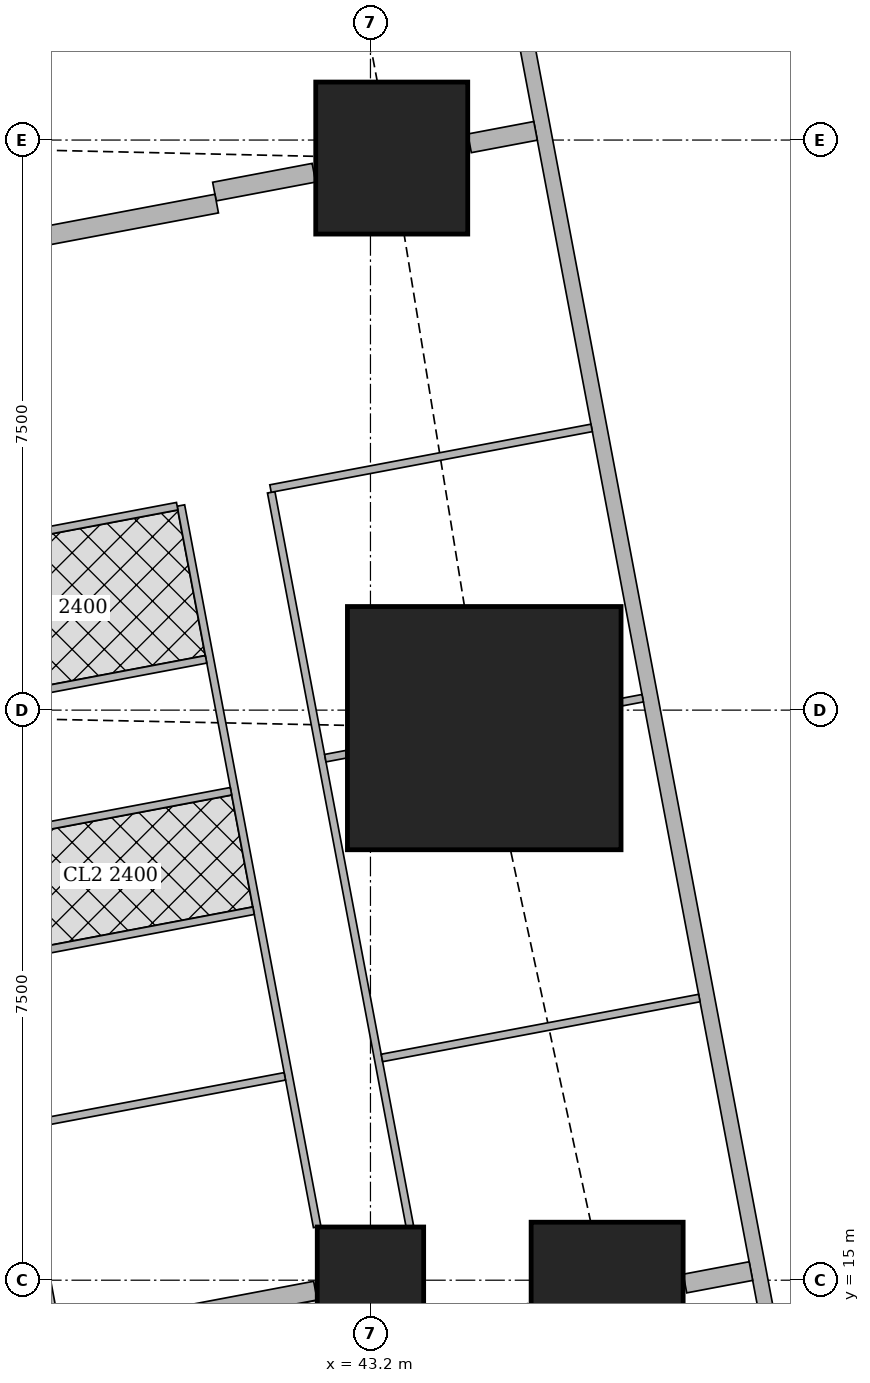
"""IFC4 building model, lengths in metres.
Left out: names, types, materials, properties, quantities, classifications, styles, units other than length and angle.
Written with IfcOpenShell. Run it as: python <this file> out.ifc"""

import sys

from ifc_helpers import new_model, si_unit, direction, frame, frame_2d, origin, origin_2d, place, context, subcontext, project, spatial, rectangle, extrude, element, fill, save


model = new_model("IFC4")
c1 = context("Model", 3, precision=1e-05, world=origin(), true_north=direction((0.0, 1.0)))
c2 = subcontext(c1, "Body", "Model", "MODEL_VIEW")
j1 = project(units=[si_unit("LENGTHUNIT", "METRE"), si_unit("PLANEANGLEUNIT", "RADIAN")], contexts=[c1])
p1 = place(None, origin())
s1 = spatial("IfcSite", under=j1, at=p1, CompositionType="ELEMENT")
p2 = place(p1, origin())
s2 = spatial("IfcBuilding", under=s1, at=p2, CompositionType="ELEMENT")
p3 = place(p2, frame((0.0, 0.0, 274.1)))
s3 = spatial("IfcBuildingStorey", under=s2, at=p3, CompositionType="ELEMENT", Elevation=274.1)
p4 = place(p3, frame((43.2, 15.0, 0.0), z_axis=(0.0, 0.0, 1.0), x_axis=(1.0, 0.0, 0.0)))
e1 = element("IfcColumn", 1, at=p4, inside=s3, PredefinedType="COLUMN", context=c2, shape_type="SweptSolid", body=[
    extrude(rectangle(XDim=1.4, YDim=1.4, at=origin_2d()), origin(), (0.0, 0.0, 1.0), 3.75),
])
p5 = place(p3, frame((46.314, 14.763, 0.0), z_axis=(0.0, 0.0, 1.0), x_axis=(1.0, 0.0, 0.0)))
e2 = element("IfcColumn", 2, at=p5, inside=s3, PredefinedType="COLUMN", context=c2, shape_type="SweptSolid", body=[
    extrude(rectangle(XDim=2.0, YDim=2.0, at=origin_2d()), origin(), (0.0, 0.0, 1.0), 3.75),
])
p6 = place(p3, frame((44.697, 22.263, 0.0), z_axis=(0.0, 0.0, 1.0), x_axis=(1.0, 0.0, 0.0)))
e3 = element("IfcColumn", 3, at=p6, inside=s3, PredefinedType="COLUMN", context=c2, shape_type="SweptSolid", body=[
    extrude(rectangle(XDim=3.6, YDim=3.2, at=origin_2d()), origin(), (0.0, 0.0, 1.0), 3.75),
])
p7 = place(p3, frame((43.48, 29.763, 0.0), z_axis=(0.0, 0.0, 1.0), x_axis=(1.0, 0.0, 0.0)))
e4 = element("IfcColumn", 4, at=p7, inside=s3, PredefinedType="COLUMN", context=c2, shape_type="SweptSolid", body=[
    extrude(rectangle(XDim=2.0, YDim=2.0, at=origin_2d()), origin(), (0.0, 0.0, 1.0), 3.75),
])
p8 = place(p3, frame((49.684, 7.832, 0.0), z_axis=(0.0, 0.0, 1.0), x_axis=(-0.185616669694, 0.982622232565, 0.0)))
e5 = element("IfcWall", 5, at=p8, inside=s3, PredefinedType="SOLIDWALL", context=c2, shape_type="SweptSolid", body=[
    extrude(rectangle(XDim=36.0, YDim=0.2, at=frame_2d((18.0, 0.0))), origin(), (0.0, 0.0, 1.0), 3.5),
])
p9 = place(p8, frame((2.518, 0.0, 0.9)))
e6 = element("IfcOpeningElement", 6, at=p9, cuts=e5, PredefinedType="OPENING", context=c2, shape_type="SweptSolid", body=[
    extrude(rectangle(XDim=2.4, YDim=1.5, at=frame_2d((1.2, 0.75))), frame((0.0, 0.11, 0.0), z_axis=(0.0, -1.0, 0.0), x_axis=(1.0, 0.0, 0.0)), (0.0, 0.0, 1.0), 0.22),
])
p10 = place(p8, frame((8.444, 0.0, 0.9)))
e7 = element("IfcOpeningElement", 7, at=p10, cuts=e5, PredefinedType="OPENING", context=c2, shape_type="SweptSolid", body=[
    extrude(rectangle(XDim=1.8, YDim=1.5, at=frame_2d((0.9, 0.75))), frame((0.0, 0.11, 0.0), z_axis=(0.0, -1.0, 0.0), x_axis=(1.0, 0.0, 0.0)), (0.0, 0.0, 1.0), 0.22),
])
p11 = place(p8, frame((12.261, 0.0, 0.9)))
e8 = element("IfcOpeningElement", 8, at=p11, cuts=e5, PredefinedType="OPENING", context=c2, shape_type="SweptSolid", body=[
    extrude(rectangle(XDim=1.8, YDim=1.5, at=frame_2d((0.9, 0.75))), frame((0.0, 0.11, 0.0), z_axis=(0.0, -1.0, 0.0), x_axis=(1.0, 0.0, 0.0)), (0.0, 0.0, 1.0), 0.22),
])
p12 = place(p8, frame((16.078, 0.0, 0.9)))
e9 = element("IfcOpeningElement", 9, at=p12, cuts=e5, PredefinedType="OPENING", context=c2, shape_type="SweptSolid", body=[
    extrude(rectangle(XDim=1.8, YDim=1.5, at=frame_2d((0.9, 0.75))), frame((0.0, 0.11, 0.0), z_axis=(0.0, -1.0, 0.0), x_axis=(1.0, 0.0, 0.0)), (0.0, 0.0, 1.0), 0.22),
])
p13 = place(p8, frame((19.894, 0.0, 0.9)))
e10 = element("IfcOpeningElement", 10, at=p13, cuts=e5, PredefinedType="OPENING", context=c2, shape_type="SweptSolid", body=[
    extrude(rectangle(XDim=1.8, YDim=1.5, at=frame_2d((0.9, 0.75))), frame((0.0, 0.11, 0.0), z_axis=(0.0, -1.0, 0.0), x_axis=(1.0, 0.0, 0.0)), (0.0, 0.0, 1.0), 0.22),
])
p14 = place(p8, frame((23.71, 0.0, 0.9)))
e11 = element("IfcOpeningElement", 11, at=p14, cuts=e5, PredefinedType="OPENING", context=c2, shape_type="SweptSolid", body=[
    extrude(rectangle(XDim=1.8, YDim=1.5, at=frame_2d((0.9, 0.75))), frame((0.0, 0.11, 0.0), z_axis=(0.0, -1.0, 0.0), x_axis=(1.0, 0.0, 0.0)), (0.0, 0.0, 1.0), 0.22),
])
p15 = place(p8, frame((27.526, 0.0, 0.9)))
e12 = element("IfcOpeningElement", 12, at=p15, cuts=e5, PredefinedType="OPENING", context=c2, shape_type="SweptSolid", body=[
    extrude(rectangle(XDim=1.8, YDim=1.5, at=frame_2d((0.9, 0.75))), frame((0.0, 0.11, 0.0), z_axis=(0.0, -1.0, 0.0), x_axis=(1.0, 0.0, 0.0)), (0.0, 0.0, 1.0), 0.22),
])
p16 = place(p8, frame((32.046, 0.0, 0.9)))
e13 = element("IfcOpeningElement", 13, at=p16, cuts=e5, PredefinedType="OPENING", context=c2, shape_type="SweptSolid", body=[
    extrude(rectangle(XDim=1.8, YDim=1.5, at=frame_2d((0.9, 0.75))), frame((0.0, 0.11, 0.0), z_axis=(0.0, -1.0, 0.0), x_axis=(1.0, 0.0, 0.0)), (0.0, 0.0, 1.0), 0.22),
])
p17 = place(p3, frame((33.781, 42.186, 0.0), z_axis=(0.0, 0.0, 1.0), x_axis=(0.185593518645, -0.9826266055, 0.0)))
e14 = element("IfcWall", 14, at=p17, inside=s3, PredefinedType="SOLIDWALL", context=c2, shape_type="SweptSolid", body=[
    extrude(rectangle(XDim=35.961, YDim=0.15, at=frame_2d((17.98, 0.0))), origin(), (0.0, 0.0, 1.0), 2.5),
])
p18 = place(p17, frame((11.76, 0.0, 0.0)))
e15 = element("IfcOpeningElement", 15, at=p18, cuts=e14, PredefinedType="OPENING", context=c2, shape_type="SweptSolid", body=[
    extrude(rectangle(XDim=1.0, YDim=2.1, at=frame_2d((0.5, 1.05))), frame((0.0, 0.085, 0.0), z_axis=(0.0, -1.0, 0.0), x_axis=(1.0, 0.0, 0.0)), (0.0, 0.0, 1.0), 0.17),
])
p19 = place(p17, frame((15.576, 0.0, 0.0)))
e16 = element("IfcOpeningElement", 16, at=p19, cuts=e14, PredefinedType="OPENING", context=c2, shape_type="SweptSolid", body=[
    extrude(rectangle(XDim=1.0, YDim=2.1, at=frame_2d((0.5, 1.05))), frame((0.0, 0.085, 0.0), z_axis=(0.0, -1.0, 0.0), x_axis=(1.0, 0.0, 0.0)), (0.0, 0.0, 1.0), 0.17),
])
p20 = place(p17, frame((30.502, 0.0, 0.0)))
e17 = element("IfcOpeningElement", 17, at=p20, cuts=e14, PredefinedType="OPENING", context=c2, shape_type="SweptSolid", body=[
    extrude(rectangle(XDim=1.0, YDim=2.1, at=frame_2d((0.5, 1.05))), frame((0.0, 0.085, 0.0), z_axis=(0.0, -1.0, 0.0), x_axis=(1.0, 0.0, 0.0)), (0.0, 0.0, 1.0), 0.17),
])
p21 = place(p3, frame((41.894, 25.366, 0.0), z_axis=(0.0, 0.0, 1.0), x_axis=(0.185612905165, -0.982622943675, 0.0)))
e18 = element("IfcWall", 18, at=p21, inside=s3, PredefinedType="PARTITIONING", context=c2, shape_type="SweptSolid", body=[
    extrude(rectangle(XDim=9.827, YDim=0.1, at=frame_2d((4.913, 0.0))), origin(), (0.0, 0.0, 1.0), 2.5),
])
p22 = place(p21, frame((0.151, 0.0, 0.0)))
e19 = element("IfcOpeningElement", 19, at=p22, cuts=e18, PredefinedType="OPENING", context=c2, shape_type="SweptSolid", body=[
    extrude(rectangle(XDim=0.9, YDim=2.1, at=frame_2d((0.45, 1.05))), frame((0.0, 0.06, 0.0), z_axis=(0.0, -1.0, 0.0), x_axis=(1.0, 0.0, 0.0)), (0.0, 0.0, 1.0), 0.12),
])
p23 = place(p21, frame((5.05, 0.0, 0.0)))
e20 = element("IfcOpeningElement", 20, at=p23, cuts=e18, PredefinedType="OPENING", context=c2, shape_type="SweptSolid", body=[
    extrude(rectangle(XDim=0.9, YDim=2.1, at=frame_2d((0.45, 1.05))), frame((0.0, 0.06, 0.0), z_axis=(0.0, -1.0, 0.0), x_axis=(1.0, 0.0, 0.0)), (0.0, 0.0, 1.0), 0.12),
])
p24 = place(p21, frame((7.783, 0.0, 0.0)))
e21 = element("IfcOpeningElement", 21, at=p24, cuts=e18, PredefinedType="OPENING", context=c2, shape_type="SweptSolid", body=[
    extrude(rectangle(XDim=0.9, YDim=2.1, at=frame_2d((0.45, 1.05))), frame((0.0, 0.06, 0.0), z_axis=(0.0, -1.0, 0.0), x_axis=(1.0, 0.0, 0.0)), (0.0, 0.0, 1.0), 0.12),
])
p25 = place(p3, frame((40.706, 25.192, 0.0), z_axis=(0.0, 0.0, 1.0), x_axis=(0.185629824463, -0.982619747547, 0.0)))
e22 = element("IfcWall", 22, at=p25, inside=s3, PredefinedType="PARTITIONING", context=c2, shape_type="SweptSolid", body=[
    extrude(rectangle(XDim=9.659, YDim=0.1, at=frame_2d((4.83, 0.0))), origin(), (0.0, 0.0, 1.0), 2.5),
])
p26 = place(p25, frame((0.575, 0.0, 0.0)))
e23 = element("IfcOpeningElement", 23, at=p26, cuts=e22, PredefinedType="OPENING", context=c2, shape_type="SweptSolid", body=[
    extrude(rectangle(XDim=0.9, YDim=2.1, at=frame_2d((0.45, 1.05))), frame((0.0, 0.06, 0.0), z_axis=(0.0, -1.0, 0.0), x_axis=(1.0, 0.0, 0.0)), (0.0, 0.0, 1.0), 0.12),
])
p27 = place(p25, frame((4.166, 0.0, 0.0)))
e24 = element("IfcOpeningElement", 24, at=p27, cuts=e22, PredefinedType="OPENING", context=c2, shape_type="SweptSolid", body=[
    extrude(rectangle(XDim=0.9, YDim=2.1, at=frame_2d((0.45, 1.05))), frame((0.0, 0.06, 0.0), z_axis=(0.0, -1.0, 0.0), x_axis=(1.0, 0.0, 0.0)), (0.0, 0.0, 1.0), 0.12),
])
p28 = place(p25, frame((2.483, 0.0, 0.0)))
e25 = element("IfcOpeningElement", 25, at=p28, cuts=e22, PredefinedType="OPENING", context=c2, shape_type="SweptSolid", body=[
    extrude(rectangle(XDim=0.9, YDim=2.1, at=frame_2d((0.45, 1.05))), frame((0.0, 0.06, 0.0), z_axis=(0.0, -1.0, 0.0), x_axis=(1.0, 0.0, 0.0)), (0.0, 0.0, 1.0), 0.12),
])
p29 = place(p25, frame((6.074, 0.0, 0.0)))
e26 = element("IfcOpeningElement", 26, at=p29, cuts=e22, PredefinedType="OPENING", context=c2, shape_type="SweptSolid", body=[
    extrude(rectangle(XDim=0.9, YDim=2.1, at=frame_2d((0.45, 1.05))), frame((0.0, 0.06, 0.0), z_axis=(0.0, -1.0, 0.0), x_axis=(1.0, 0.0, 0.0)), (0.0, 0.0, 1.0), 0.12),
])
p30 = place(p3, frame((46.11, 26.213, 0.0), z_axis=(0.0, 0.0, 1.0), x_axis=(-0.982633535512, -0.185556823879, 0.0)))
e27 = element("IfcWall", 27, at=p30, inside=s3, PredefinedType="PARTITIONING", context=c2, shape_type="SweptSolid", body=[
    extrude(rectangle(XDim=4.3, YDim=0.1, at=frame_2d((2.15, 0.0))), origin(), (0.0, 0.0, 1.0), 2.5),
])
p31 = place(p3, frame((46.782, 22.657, 0.0), z_axis=(0.0, 0.0, 1.0), x_axis=(-0.982574553168, -0.185868898601, 0.0)))
e28 = element("IfcWall", 28, at=p31, inside=s3, PredefinedType="PARTITIONING", context=c2, shape_type="SweptSolid", body=[
    extrude(rectangle(XDim=0.28, YDim=0.1, at=frame_2d((0.14, 0.0))), origin(), (0.0, 0.0, 1.0), 3.5),
])
p32 = place(p3, frame((42.887, 21.921, 0.0), z_axis=(0.0, 0.0, 1.0), x_axis=(-0.982688058078, -0.185267861514, 0.0)))
e29 = element("IfcWall", 29, at=p32, inside=s3, PredefinedType="PARTITIONING", context=c2, shape_type="SweptSolid", body=[
    extrude(rectangle(XDim=0.286, YDim=0.1, at=frame_2d((0.143, 0.0))), origin(), (0.0, 0.0, 1.0), 2.5),
])
p33 = place(p3, frame((47.527, 18.712, 0.0), z_axis=(0.0, 0.0, 1.0), x_axis=(-0.982665405803, -0.185387972203, 0.0)))
e30 = element("IfcWall", 30, at=p33, inside=s3, PredefinedType="PARTITIONING", context=c2, shape_type="SweptSolid", body=[
    extrude(rectangle(XDim=4.25, YDim=0.1, at=frame_2d((2.125, 0.0))), origin(), (0.0, 0.0, 1.0), 2.5),
])
p34 = place(p3, frame((40.657, 25.183, 0.0), z_axis=(0.0, 0.0, 1.0), x_axis=(-0.982585626838, -0.185810349366, 0.0)))
e31 = element("IfcWall", 31, at=p34, inside=s3, PredefinedType="PARTITIONING", context=c2, shape_type="SweptSolid", body=[
    extrude(rectangle(XDim=3.525, YDim=0.1, at=frame_2d((1.763, 0.0))), origin(), (0.0, 0.0, 1.0), 3.5),
])
p35 = place(p3, frame((41.365, 21.433, 0.0), z_axis=(0.0, 0.0, 1.0), x_axis=(-0.982638553676, -0.185530247748, 0.0)))
e32 = element("IfcWall", 32, at=p35, inside=s3, PredefinedType="PARTITIONING", context=c2, shape_type="SweptSolid", body=[
    extrude(rectangle(XDim=3.525, YDim=0.1, at=frame_2d((1.763, 0.0))), origin(), (0.0, 0.0, 1.0), 3.5),
])
p36 = place(p3, frame((42.073, 17.682, 0.0), z_axis=(0.0, 0.0, 1.0), x_axis=(-0.98265117712, -0.185463376723, 0.0)))
e33 = element("IfcWall", 33, at=p36, inside=s3, PredefinedType="PARTITIONING", context=c2, shape_type="SweptSolid", body=[
    extrude(rectangle(XDim=3.525, YDim=0.1, at=frame_2d((1.763, 0.0))), origin(), (0.0, 0.0, 1.0), 3.5),
])
p37 = place(p36, frame((1.325, 0.0, 0.0)))
e34 = element("IfcOpeningElement", 34, at=p37, cuts=e33, PredefinedType="OPENING", context=c2, shape_type="SweptSolid", body=[
    extrude(rectangle(XDim=0.9, YDim=2.1, at=frame_2d((0.45, 1.05))), frame((0.0, 0.06, 0.0), z_axis=(0.0, -1.0, 0.0), x_axis=(1.0, 0.0, 0.0)), (0.0, 0.0, 1.0), 0.12),
])
p38 = place(p3, frame((41.037, 23.168, 0.0), z_axis=(0.0, 0.0, 1.0), x_axis=(-0.982638553676, -0.185530247748, 0.0)))
e35 = element("IfcWall", 35, at=p38, inside=s3, PredefinedType="PARTITIONING", context=c2, shape_type="SweptSolid", body=[
    extrude(rectangle(XDim=3.525, YDim=0.1, at=frame_2d((1.763, 0.0))), origin(), (0.0, 0.0, 1.0), 2.5),
])
p39 = place(p3, frame((41.662, 19.861, 0.0), z_axis=(0.0, 0.0, 1.0), x_axis=(-0.982588017646, -0.185797706064, 0.0)))
e36 = element("IfcWall", 36, at=p39, inside=s3, PredefinedType="PARTITIONING", context=c2, shape_type="SweptSolid", body=[
    extrude(rectangle(XDim=3.525, YDim=0.1, at=frame_2d((1.763, 0.0))), origin(), (0.0, 0.0, 1.0), 3.5),
])
p40 = place(p3, frame((45.372, 30.121, 0.0), z_axis=(0.0, 0.0, 1.0), x_axis=(-0.982608419258, -0.185689780017, 0.0)))
e37 = element("IfcWall", 37, at=p40, inside=s3, PredefinedType="SOLIDWALL", context=c2, shape_type="SweptSolid", body=[
    extrude(rectangle(XDim=0.884, YDim=0.25, at=frame_2d((0.442, 0.0))), origin(), (0.0, 0.0, 1.0), 3.5),
])
p41 = place(p3, frame((42.456, 29.57, 0.0), z_axis=(0.0, 0.0, 1.0), x_axis=(-0.982517742323, -0.18616897169, 0.0)))
e38 = element("IfcWall", 38, at=p41, inside=s3, PredefinedType="SOLIDWALL", context=c2, shape_type="SweptSolid", body=[
    extrude(rectangle(XDim=1.332, YDim=0.25, at=frame_2d((0.666, 0.0))), origin(), (0.0, 0.0, 1.0), 2.5),
])
p42 = place(p3, frame((41.177, 29.164, 0.0), z_axis=(0.0, 0.0, 1.0), x_axis=(-0.982642846239, -0.185507511263, 0.0)))
e39 = element("IfcWall", 39, at=p42, inside=s3, PredefinedType="SOLIDWALL", context=c2, shape_type="SweptSolid", body=[
    extrude(rectangle(XDim=4.776, YDim=0.25, at=frame_2d((2.388, 0.0))), origin(), (0.0, 0.0, 1.0), 2.5),
])
p43 = place(p3, frame((48.206, 15.12, 0.0), z_axis=(0.0, 0.0, 1.0), x_axis=(-0.982608419258, -0.185689780017, 0.0)))
e40 = element("IfcWall", 40, at=p43, inside=s3, PredefinedType="SOLIDWALL", context=c2, shape_type="SweptSolid", body=[
    extrude(rectangle(XDim=0.884, YDim=0.25, at=frame_2d((0.442, 0.0))), origin(), (0.0, 0.0, 1.0), 3.5),
])
p44 = place(p3, frame((42.476, 14.863, 0.0), z_axis=(0.0, 0.0, 1.0), x_axis=(-0.982603567712, -0.185715450942, 0.0)))
e41 = element("IfcWall", 41, at=p44, inside=s3, PredefinedType="SOLIDWALL", context=c2, shape_type="SweptSolid", body=[
    extrude(rectangle(XDim=3.398, YDim=0.25, at=frame_2d((1.699, 0.0))), origin(), (0.0, 0.0, 1.0), 3.5),
])
p45 = place(p10, origin())
e42 = element("IfcWindow", 42, at=p45, inside=s3, PartitioningType="SINGLE_PANEL", PredefinedType="WINDOW", context=c2, shape_type="SweptSolid", body=[
    extrude(rectangle(XDim=1.8, YDim=1.5, at=frame_2d((0.9, 0.75))), frame((0.0, 0.03, 0.0), z_axis=(0.0, -1.0, 0.0), x_axis=(1.0, 0.0, 0.0)), (0.0, 0.0, 1.0), 0.06),
])
fill(e7, e42)
p46 = place(p11, origin())
e43 = element("IfcWindow", 43, at=p46, inside=s3, PartitioningType="SINGLE_PANEL", PredefinedType="WINDOW", context=c2, shape_type="SweptSolid", body=[
    extrude(rectangle(XDim=1.8, YDim=1.5, at=frame_2d((0.9, 0.75))), frame((0.0, 0.03, 0.0), z_axis=(0.0, -1.0, 0.0), x_axis=(1.0, 0.0, 0.0)), (0.0, 0.0, 1.0), 0.06),
])
fill(e8, e43)
p47 = place(p12, origin())
e44 = element("IfcWindow", 44, at=p47, inside=s3, PartitioningType="SINGLE_PANEL", PredefinedType="WINDOW", context=c2, shape_type="SweptSolid", body=[
    extrude(rectangle(XDim=1.8, YDim=1.5, at=frame_2d((0.9, 0.75))), frame((0.0, 0.03, 0.0), z_axis=(0.0, -1.0, 0.0), x_axis=(1.0, 0.0, 0.0)), (0.0, 0.0, 1.0), 0.06),
])
fill(e9, e44)
p48 = place(p13, origin())
e45 = element("IfcWindow", 45, at=p48, inside=s3, PartitioningType="SINGLE_PANEL", PredefinedType="WINDOW", context=c2, shape_type="SweptSolid", body=[
    extrude(rectangle(XDim=1.8, YDim=1.5, at=frame_2d((0.9, 0.75))), frame((0.0, 0.03, 0.0), z_axis=(0.0, -1.0, 0.0), x_axis=(1.0, 0.0, 0.0)), (0.0, 0.0, 1.0), 0.06),
])
fill(e10, e45)
p49 = place(p14, origin())
e46 = element("IfcWindow", 46, at=p49, inside=s3, PartitioningType="SINGLE_PANEL", PredefinedType="WINDOW", context=c2, shape_type="SweptSolid", body=[
    extrude(rectangle(XDim=1.8, YDim=1.5, at=frame_2d((0.9, 0.75))), frame((0.0, 0.03, 0.0), z_axis=(0.0, -1.0, 0.0), x_axis=(1.0, 0.0, 0.0)), (0.0, 0.0, 1.0), 0.06),
])
fill(e11, e46)
p50 = place(p22, origin())
e47 = element("IfcDoor", 47, at=p50, inside=s3, OperationType="SINGLE_SWING_LEFT", PredefinedType="DOOR", context=c2, shape_type="SweptSolid", body=[
    extrude(rectangle(XDim=0.9, YDim=2.1, at=frame_2d((0.45, 1.05))), frame((0.0, 0.025, 0.0), z_axis=(0.0, -1.0, 0.0), x_axis=(1.0, 0.0, 0.0)), (0.0, 0.0, 1.0), 0.05),
])
fill(e19, e47)
p51 = place(p23, origin())
e48 = element("IfcDoor", 48, at=p51, inside=s3, OperationType="SINGLE_SWING_LEFT", PredefinedType="DOOR", context=c2, shape_type="SweptSolid", body=[
    extrude(rectangle(XDim=0.9, YDim=2.1, at=frame_2d((0.45, 1.05))), frame((0.0, 0.025, 0.0), z_axis=(0.0, -1.0, 0.0), x_axis=(1.0, 0.0, 0.0)), (0.0, 0.0, 1.0), 0.05),
])
fill(e20, e48)
p52 = place(p24, origin())
e49 = element("IfcDoor", 49, at=p52, inside=s3, OperationType="SINGLE_SWING_LEFT", PredefinedType="DOOR", context=c2, shape_type="SweptSolid", body=[
    extrude(rectangle(XDim=0.9, YDim=2.1, at=frame_2d((0.45, 1.05))), frame((0.0, 0.025, 0.0), z_axis=(0.0, -1.0, 0.0), x_axis=(1.0, 0.0, 0.0)), (0.0, 0.0, 1.0), 0.05),
])
fill(e21, e49)
p53 = place(p26, origin())
e50 = element("IfcDoor", 50, at=p53, inside=s3, OperationType="SINGLE_SWING_RIGHT", PredefinedType="DOOR", context=c2, shape_type="SweptSolid", body=[
    extrude(rectangle(XDim=0.9, YDim=2.1, at=frame_2d((0.45, 1.05))), frame((0.0, 0.025, 0.0), z_axis=(0.0, -1.0, 0.0), x_axis=(1.0, 0.0, 0.0)), (0.0, 0.0, 1.0), 0.05),
])
fill(e23, e50)
p54 = place(p27, origin())
e51 = element("IfcDoor", 51, at=p54, inside=s3, OperationType="SINGLE_SWING_RIGHT", PredefinedType="DOOR", context=c2, shape_type="SweptSolid", body=[
    extrude(rectangle(XDim=0.9, YDim=2.1, at=frame_2d((0.45, 1.05))), frame((0.0, 0.025, 0.0), z_axis=(0.0, -1.0, 0.0), x_axis=(1.0, 0.0, 0.0)), (0.0, 0.0, 1.0), 0.05),
])
fill(e24, e51)
p55 = place(p28, origin())
e52 = element("IfcDoor", 52, at=p55, inside=s3, OperationType="SINGLE_SWING_RIGHT", PredefinedType="DOOR", context=c2, shape_type="SweptSolid", body=[
    extrude(rectangle(XDim=0.9, YDim=2.1, at=frame_2d((0.45, 1.05))), frame((0.0, 0.025, 0.0), z_axis=(0.0, -1.0, 0.0), x_axis=(1.0, 0.0, 0.0)), (0.0, 0.0, 1.0), 0.05),
])
fill(e25, e52)
p56 = place(p29, origin())
e53 = element("IfcDoor", 53, at=p56, inside=s3, OperationType="SINGLE_SWING_LEFT", PredefinedType="DOOR", context=c2, shape_type="SweptSolid", body=[
    extrude(rectangle(XDim=0.9, YDim=2.1, at=frame_2d((0.45, 1.05))), frame((0.0, 0.025, 0.0), z_axis=(0.0, -1.0, 0.0), x_axis=(1.0, 0.0, 0.0)), (0.0, 0.0, 1.0), 0.05),
])
fill(e26, e53)
p57 = place(p37, origin())
e54 = element("IfcDoor", 54, at=p57, inside=s3, OperationType="SINGLE_SWING_RIGHT", PredefinedType="DOOR", context=c2, shape_type="SweptSolid", body=[
    extrude(rectangle(XDim=0.9, YDim=2.1, at=frame_2d((0.45, 1.05))), frame((0.0, 0.025, 0.0), z_axis=(0.0, -1.0, 0.0), x_axis=(1.0, 0.0, 0.0)), (0.0, 0.0, 1.0), 0.05),
])
fill(e34, e54)
save(model, sys.argv[1])
